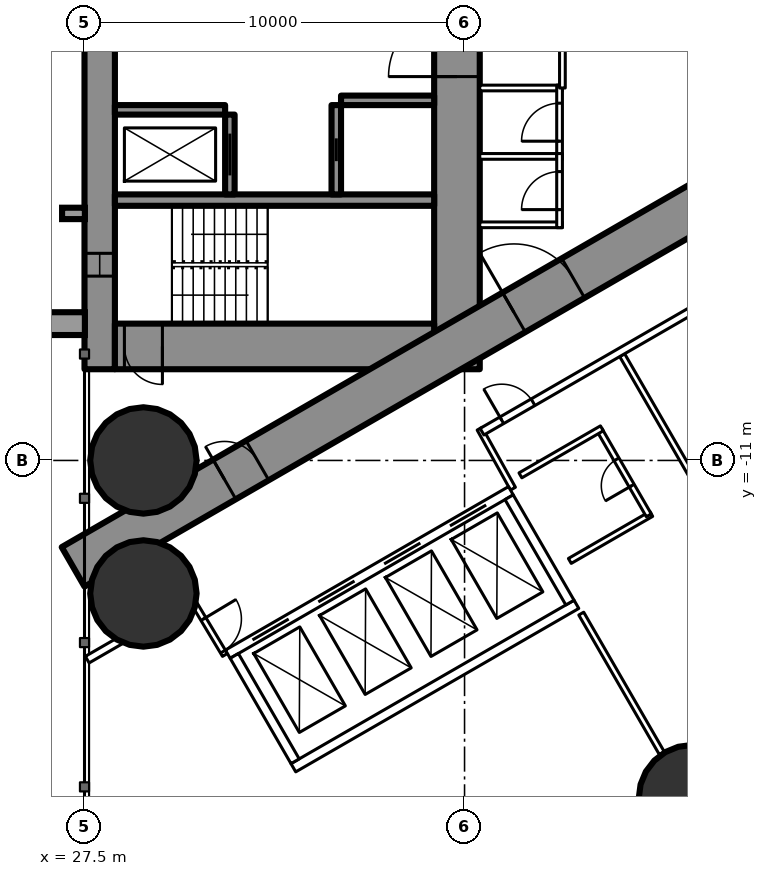
"""IFC4 building model, lengths in metres.
Left out: names, types, materials, properties, quantities, classifications, styles, units other than length and angle.
Written with IfcOpenShell. Run it as: python <this file> out.ifc"""

import sys

from ifc_helpers import new_model, si_unit, direction, frame, frame_2d, origin, origin_2d, place, context, subcontext, project, spatial, rectangle, hollow_circle, extrude, element, fill, save


model = new_model("IFC4")
c1 = context("Model", 3, precision=1e-05, world=origin(), true_north=direction((0.0, 1.0)))
c2 = subcontext(c1, "Body", "Model", "MODEL_VIEW")
j1 = project(units=[si_unit("LENGTHUNIT", "METRE"), si_unit("PLANEANGLEUNIT", "RADIAN")], contexts=[c1])
p1 = place(None, origin())
s1 = spatial("IfcSite", under=j1, at=p1, CompositionType="ELEMENT")
p2 = place(p1, origin())
s2 = spatial("IfcBuilding", under=s1, at=p2, CompositionType="ELEMENT")
p3 = place(p2, frame((0.0, 0.0, 70.5)))
s3 = spatial("IfcBuildingStorey", under=s2, at=p3, CompositionType="ELEMENT", Elevation=70.5)
for number, where, z_axis, x_axis in (
    (1, (29.05, -11.0, 0.0), (0.0, 0.0, 1.0), (1.0, 0.0, 0.0)),
    (2, (29.05, -14.5, 0.0), (0.0, 0.0, 1.0), (1.0, 0.0, 0.0)),
    (3, (43.484, -19.886, 0.0), (0.0, 0.0, 1.0), (1.0, 0.0, 0.0)),
):
    element("IfcColumn", number, at=place(p3, frame(where, z_axis=z_axis, x_axis=x_axis)), inside=s3, PredefinedType="COLUMN", context=c2, shape_type="SweptSolid", body=[
        extrude(hollow_circle(Radius=1.4, WallThickness=0.12, at=origin_2d()), origin(), (0.0, 0.0, 1.0), 3.5),
    ])
p4 = place(p3, frame((27.9, -8.6, 0.0), z_axis=(0.0, 0.0, 1.0), x_axis=(0.0, 1.0, 0.0)))
e4 = element("IfcWall", 4, at=p4, inside=s3, PredefinedType="SHEAR", context=c2, shape_type="SweptSolid", body=[
    extrude(rectangle(XDim=17.2, YDim=0.8, at=frame_2d((8.6, 0.0))), origin(), (0.0, 0.0, 1.0), 3.5),
])
p5 = place(p4, frame((2.45, 0.0, 0.6)))
e5 = element("IfcOpeningElement", 5, at=p5, cuts=e4, PredefinedType="OPENING", context=c2, shape_type="SweptSolid", body=[
    extrude(rectangle(XDim=0.6, YDim=2.1, at=frame_2d((0.3, 1.05))), frame((0.0, 0.41, 0.0), z_axis=(0.0, -1.0, 0.0), x_axis=(1.0, 0.0, 0.0)), (0.0, 0.0, 1.0), 0.82),
])
p6 = place(p4, frame((14.15, 0.0, 0.6)))
e6 = element("IfcOpeningElement", 6, at=p6, cuts=e4, PredefinedType="OPENING", context=c2, shape_type="SweptSolid", body=[
    extrude(rectangle(XDim=0.6, YDim=2.1, at=frame_2d((0.3, 1.05))), frame((0.0, 0.41, 0.0), z_axis=(0.0, -1.0, 0.0), x_axis=(1.0, 0.0, 0.0)), (0.0, 0.0, 1.0), 0.82),
])
p7 = place(p3, frame((37.3, -8.6, 0.0), z_axis=(0.0, 0.0, 1.0), x_axis=(0.0, 1.0, 0.0)))
e7 = element("IfcWall", 7, at=p7, inside=s3, PredefinedType="SHEAR", context=c2, shape_type="SweptSolid", body=[
    extrude(rectangle(XDim=17.2, YDim=1.2, at=frame_2d((8.6, 0.0))), origin(), (0.0, 0.0, 1.0), 3.5),
])
p8 = place(p7, frame((7.7, 0.0, 0.0)))
e8 = element("IfcOpeningElement", 8, at=p8, cuts=e7, PredefinedType="OPENING", context=c2, shape_type="SweptSolid", body=[
    extrude(rectangle(XDim=1.8, YDim=2.2, at=frame_2d((0.9, 1.1))), frame((0.0, 0.61, 0.0), z_axis=(0.0, -1.0, 0.0), x_axis=(1.0, 0.0, 0.0)), (0.0, 0.0, 1.0), 1.22),
])
p9 = place(p3, frame((28.3, -8.0, 0.0), z_axis=(0.0, 0.0, 1.0), x_axis=(1.0, 0.0, 0.0)))
e9 = element("IfcWall", 9, at=p9, inside=s3, PredefinedType="SHEAR", context=c2, shape_type="SweptSolid", body=[
    extrude(rectangle(XDim=8.4, YDim=1.2, at=frame_2d((4.2, 0.0))), origin(), (0.0, 0.0, 1.0), 3.5),
])
p10 = place(p9, frame((0.25, 0.0, 0.0)))
e10 = element("IfcOpeningElement", 10, at=p10, cuts=e9, PredefinedType="OPENING", context=c2, shape_type="SweptSolid", body=[
    extrude(rectangle(XDim=1.0, YDim=2.2, at=frame_2d((0.5, 1.1))), frame((0.0, 0.61, 0.0), z_axis=(0.0, -1.0, 0.0), x_axis=(1.0, 0.0, 0.0)), (0.0, 0.0, 1.0), 1.22),
])
p11 = place(p3, frame((28.3, -4.15, 0.0), z_axis=(0.0, 0.0, 1.0), x_axis=(1.0, 0.0, 0.0)))
e11 = element("IfcWall", 11, at=p11, inside=s3, PredefinedType="SHEAR", context=c2, shape_type="SweptSolid", body=[
    extrude(rectangle(XDim=8.4, YDim=0.3, at=frame_2d((4.2, 0.0))), origin(), (0.0, 0.0, 1.0), 3.5),
])
p12 = place(p3, frame((31.325, -4.0, 0.0), z_axis=(0.0, 0.0, 1.0), x_axis=(0.0, 1.0, 0.0)))
e12 = element("IfcWall", 12, at=p12, inside=s3, PredefinedType="SHEAR", context=c2, shape_type="SweptSolid", body=[
    extrude(rectangle(XDim=2.1, YDim=0.25, at=frame_2d((1.05, 0.0))), origin(), (0.0, 0.0, 1.0), 3.5),
])
p13 = place(p12, frame((0.5, 0.0, 0.0)))
e13 = element("IfcOpeningElement", 13, at=p13, cuts=e12, PredefinedType="OPENING", context=c2, shape_type="SweptSolid", body=[
    extrude(rectangle(XDim=1.1, YDim=2.2, at=frame_2d((0.55, 1.1))), frame((0.0, 0.135, 0.0), z_axis=(0.0, -1.0, 0.0), x_axis=(1.0, 0.0, 0.0)), (0.0, 0.0, 1.0), 0.27),
])
p14 = place(p3, frame((34.125, -4.0, 0.0), z_axis=(0.0, 0.0, 1.0), x_axis=(0.0, 1.0, 0.0)))
e14 = element("IfcWall", 14, at=p14, inside=s3, PredefinedType="SHEAR", context=c2, shape_type="SweptSolid", body=[
    extrude(rectangle(XDim=2.35, YDim=0.25, at=frame_2d((1.175, 0.0))), origin(), (0.0, 0.0, 1.0), 3.5),
])
p15 = place(p14, frame((0.875, 0.0, 0.0)))
e15 = element("IfcOpeningElement", 15, at=p15, cuts=e14, PredefinedType="OPENING", context=c2, shape_type="SweptSolid", body=[
    extrude(rectangle(XDim=0.6, YDim=2.0, at=frame_2d((0.3, 1.0))), frame((0.0, 0.135, 0.0), z_axis=(0.0, -1.0, 0.0), x_axis=(1.0, 0.0, 0.0)), (0.0, 0.0, 1.0), 0.27),
])
p16 = place(p3, frame((28.3, -1.775, 0.0), z_axis=(0.0, 0.0, 1.0), x_axis=(1.0, 0.0, 0.0)))
e16 = element("IfcWall", 16, at=p16, inside=s3, PredefinedType="SHEAR", context=c2, shape_type="SweptSolid", body=[
    extrude(rectangle(XDim=2.9, YDim=0.25, at=frame_2d((1.45, 0.0))), origin(), (0.0, 0.0, 1.0), 3.5),
])
p17 = place(p3, frame((34.25, -1.525, 0.0), z_axis=(0.0, 0.0, 1.0), x_axis=(1.0, 0.0, 0.0)))
e17 = element("IfcWall", 17, at=p17, inside=s3, PredefinedType="SHEAR", context=c2, shape_type="SweptSolid", body=[
    extrude(rectangle(XDim=2.45, YDim=0.25, at=frame_2d((1.225, 0.0))), origin(), (0.0, 0.0, 1.0), 3.5),
])
p18 = place(p3, frame((27.2, -13.8, 0.0), z_axis=(0.0, 0.0, 1.0), x_axis=(0.866027159892, 0.499996958321, 0.0)))
e18 = element("IfcWall", 18, at=p18, inside=s3, PredefinedType="SHEAR", context=c2, shape_type="SweptSolid", body=[
    extrude(rectangle(XDim=27.947, YDim=1.2, at=frame_2d((13.973, 0.0))), origin(), (0.0, 0.0, 1.0), 3.5),
])
p19 = place(p18, frame((4.6, 0.0, 0.0)))
e19 = element("IfcOpeningElement", 19, at=p19, cuts=e18, PredefinedType="OPENING", context=c2, shape_type="SweptSolid", body=[
    extrude(rectangle(XDim=1.0, YDim=2.2, at=frame_2d((0.5, 1.1))), frame((0.0, 0.61, 0.0), z_axis=(0.0, -1.0, 0.0), x_axis=(1.0, 0.0, 0.0)), (0.0, 0.0, 1.0), 1.22),
])
p20 = place(p18, frame((13.395, 0.0, 0.0)))
e20 = element("IfcOpeningElement", 20, at=p20, cuts=e18, PredefinedType="OPENING", context=c2, shape_type="SweptSolid", body=[
    extrude(rectangle(XDim=1.8, YDim=2.2, at=frame_2d((0.9, 1.1))), frame((0.0, 0.61, 0.0), z_axis=(0.0, -1.0, 0.0), x_axis=(1.0, 0.0, 0.0)), (0.0, 0.0, 1.0), 1.22),
])
p21 = place(p3, frame((41.647, -8.23, 0.0), z_axis=(0.0, 0.0, 1.0), x_axis=(0.49998590462, -0.866033541603, 0.0)))
e21 = element("IfcWall", 21, at=p21, inside=s3, PredefinedType="PARTITIONING", context=c2, shape_type="SweptSolid", body=[
    extrude(rectangle(XDim=12.621, YDim=0.15, at=frame_2d((6.311, 0.0))), origin(), (0.0, 0.0, 1.0), 3.25),
])
p22 = place(p3, frame((40.57, -15.03, 0.0), z_axis=(0.0, 0.0, 1.0), x_axis=(0.500012993597, -0.866017901798, 0.0)))
e22 = element("IfcWall", 22, at=p22, inside=s3, PredefinedType="PARTITIONING", context=c2, shape_type="SweptSolid", body=[
    extrude(rectangle(XDim=4.243, YDim=0.15, at=frame_2d((2.122, 0.0))), origin(), (0.0, 0.0, 1.0), 3.25),
])
p23 = place(p3, frame((27.572, -16.241, 0.0), z_axis=(0.0, 0.0, 1.0), x_axis=(0.866029654818, 0.499992636921, 0.0)))
e23 = element("IfcWall", 23, at=p23, inside=s3, PredefinedType="PARTITIONING", context=c2, shape_type="SweptSolid", body=[
    extrude(rectangle(XDim=3.155, YDim=0.2, at=frame_2d((1.577, 0.0))), origin(), (0.0, 0.0, 1.0), 3.25),
])
p24 = place(p3, frame((38.773, -11.742, 0.0), z_axis=(0.0, 0.0, 1.0), x_axis=(-0.485528096672, 0.8742210632, 0.0)))
e24 = element("IfcWall", 24, at=p24, inside=s3, PredefinedType="PARTITIONING", context=c2, shape_type="SweptSolid", body=[
    extrude(rectangle(XDim=1.805, YDim=0.15, at=frame_2d((0.903, 0.0))), origin(), (0.0, 0.0, 1.0), 3.25),
])
p25 = place(p3, frame((30.267, -14.569, 0.0), z_axis=(0.0, 0.0, 1.0), x_axis=(0.514336634837, -0.857588377991, 0.0)))
e25 = element("IfcWall", 25, at=p25, inside=s3, PredefinedType="PARTITIONING", context=c2, shape_type="SweptSolid", body=[
    extrude(rectangle(XDim=1.805, YDim=0.15, at=frame_2d((0.903, 0.0))), origin(), (0.0, 0.0, 1.0), 3.25),
])
p26 = place(p25, frame((0.703, 0.0, 0.0)))
e26 = element("IfcOpeningElement", 26, at=p26, cuts=e25, PredefinedType="OPENING", context=c2, shape_type="SweptSolid", body=[
    extrude(rectangle(XDim=1.0, YDim=2.2, at=frame_2d((0.5, 1.1))), frame((0.0, 0.085, 0.0), z_axis=(0.0, -1.0, 0.0), x_axis=(1.0, 0.0, 0.0)), (0.0, 0.0, 1.0), 0.17),
])
p27 = place(p3, frame((37.96, -10.243, 0.0), z_axis=(0.0, 0.0, 1.0), x_axis=(0.866030548046, 0.499991089772, 0.0)))
e27 = element("IfcWall", 27, at=p27, inside=s3, PredefinedType="PARTITIONING", context=c2, shape_type="SweptSolid", body=[
    extrude(rectangle(XDim=12.849, YDim=0.2, at=frame_2d((6.425, 0.0))), origin(), (0.0, 0.0, 1.0), 3.25),
])
p28 = place(p27, frame((8.949, 0.0, 0.0)))
e28 = element("IfcOpeningElement", 28, at=p28, cuts=e27, PredefinedType="OPENING", context=c2, shape_type="SweptSolid", body=[
    extrude(rectangle(XDim=0.95, YDim=2.2, at=frame_2d((0.475, 1.1))), frame((0.0, 0.11, 0.0), z_axis=(0.0, -1.0, 0.0), x_axis=(1.0, 0.0, 0.0)), (0.0, 0.0, 1.0), 0.22),
])
p29 = place(p27, frame((0.6, 0.0, 0.0)))
e29 = element("IfcOpeningElement", 29, at=p29, cuts=e27, PredefinedType="OPENING", context=c2, shape_type="SweptSolid", body=[
    extrude(rectangle(XDim=0.95, YDim=2.2, at=frame_2d((0.475, 1.1))), frame((0.0, 0.11, 0.0), z_axis=(0.0, -1.0, 0.0), x_axis=(1.0, 0.0, 0.0)), (0.0, 0.0, 1.0), 0.22),
])
p30 = place(p3, frame((40.27, -13.644, 0.0), z_axis=(0.0, 0.0, 1.0), x_axis=(0.866031185235, 0.4999899861, 0.0)))
e30 = element("IfcWall", 30, at=p30, inside=s3, PredefinedType="PARTITIONING", context=c2, shape_type="SweptSolid", body=[
    extrude(rectangle(XDim=2.475, YDim=0.15, at=frame_2d((1.238, 0.0))), origin(), (0.0, 0.0, 1.0), 3.25),
])
p31 = place(p3, frame((41.048, -10.193, 0.0), z_axis=(0.0, 0.0, 1.0), x_axis=(0.500047596559, -0.865997922154, 0.0)))
e31 = element("IfcWall", 31, at=p31, inside=s3, PredefinedType="PARTITIONING", context=c2, shape_type="SweptSolid", body=[
    extrude(rectangle(XDim=2.6, YDim=0.15, at=frame_2d((1.3, 0.0))), origin(), (0.0, 0.0, 1.0), 3.25),
])
p32 = place(p31, frame((0.9, 0.0, 0.0)))
e32 = element("IfcOpeningElement", 32, at=p32, cuts=e31, PredefinedType="OPENING", context=c2, shape_type="SweptSolid", body=[
    extrude(rectangle(XDim=0.8, YDim=2.2, at=frame_2d((0.4, 1.1))), frame((0.0, 0.085, 0.0), z_axis=(0.0, -1.0, 0.0), x_axis=(1.0, 0.0, 0.0)), (0.0, 0.0, 1.0), 0.17),
])
p33 = place(p3, frame((38.97, -11.393, 0.0), z_axis=(0.0, 0.0, 1.0), x_axis=(0.866031185235, 0.4999899861, 0.0)))
e33 = element("IfcWall", 33, at=p33, inside=s3, PredefinedType="PARTITIONING", context=c2, shape_type="SweptSolid", body=[
    extrude(rectangle(XDim=2.475, YDim=0.15, at=frame_2d((1.238, 0.0))), origin(), (0.0, 0.0, 1.0), 3.25),
])
for number, where, z_axis, x_axis in (
    (34, (37.9, -1.2, 0.0), (0.0, 0.0, 1.0), (1.0, 0.0, 0.0)),
    (35, (37.9, -3.0, 0.0), (0.0, 0.0, 1.0), (1.0, 0.0, 0.0)),
    (36, (37.9, -4.8, 0.0), (0.0, 0.0, 1.0), (1.0, 0.0, 0.0)),
):
    element("IfcWall", number, at=place(p3, frame(where, z_axis=z_axis, x_axis=x_axis)), inside=s3, PredefinedType="PARTITIONING", context=c2, shape_type="SweptSolid", body=[
        extrude(rectangle(XDim=2.175, YDim=0.15, at=frame_2d((1.087, 0.0))), origin(), (0.0, 0.0, 1.0), 3.25),
    ])
p34 = place(p3, frame((40.0, -3.075, 0.0), z_axis=(0.0, 0.0, 1.0), x_axis=(0.0, 1.0, 0.0)))
e37 = element("IfcWall", 37, at=p34, inside=s3, PredefinedType="PARTITIONING", context=c2, shape_type="SweptSolid", body=[
    extrude(rectangle(XDim=1.95, YDim=0.15, at=frame_2d((0.975, 0.0))), origin(), (0.0, 0.0, 1.0), 3.25),
])
p35 = place(p34, frame((0.475, 0.0, 0.0)))
e38 = element("IfcOpeningElement", 38, at=p35, cuts=e37, PredefinedType="OPENING", context=c2, shape_type="SweptSolid", body=[
    extrude(rectangle(XDim=1.0, YDim=2.2, at=frame_2d((0.5, 1.1))), frame((0.0, 0.085, 0.0), z_axis=(0.0, -1.0, 0.0), x_axis=(1.0, 0.0, 0.0)), (0.0, 0.0, 1.0), 0.17),
])
p36 = place(p3, frame((40.0, -4.875, 0.0), z_axis=(0.0, 0.0, 1.0), x_axis=(0.0, 1.0, 0.0)))
e39 = element("IfcWall", 39, at=p36, inside=s3, PredefinedType="PARTITIONING", context=c2, shape_type="SweptSolid", body=[
    extrude(rectangle(XDim=1.95, YDim=0.15, at=frame_2d((0.975, 0.0))), origin(), (0.0, 0.0, 1.0), 3.25),
])
p37 = place(p36, frame((0.475, 0.0, 0.0)))
e40 = element("IfcOpeningElement", 40, at=p37, cuts=e39, PredefinedType="OPENING", context=c2, shape_type="SweptSolid", body=[
    extrude(rectangle(XDim=1.0, YDim=2.2, at=frame_2d((0.5, 1.1))), frame((0.0, 0.085, 0.0), z_axis=(0.0, -1.0, 0.0), x_axis=(1.0, 0.0, 0.0)), (0.0, 0.0, 1.0), 0.17),
])
p38 = place(p3, frame((40.075, -1.2, 0.0), z_axis=(0.0, 0.0, 1.0), x_axis=(0.0, 1.0, 0.0)))
e41 = element("IfcWall", 41, at=p38, inside=s3, PredefinedType="PARTITIONING", context=c2, shape_type="SweptSolid", body=[
    extrude(rectangle(XDim=6.874, YDim=0.15, at=frame_2d((3.437, 0.0))), origin(), (0.0, 0.0, 1.0), 3.25),
])
p39 = place(p38, frame((2.537, 0.0, 0.0)))
e42 = element("IfcOpeningElement", 42, at=p39, cuts=e41, PredefinedType="OPENING", context=c2, shape_type="SweptSolid", body=[
    extrude(rectangle(XDim=1.8, YDim=2.2, at=frame_2d((0.9, 1.1))), frame((0.0, 0.085, 0.0), z_axis=(0.0, -1.0, 0.0), x_axis=(1.0, 0.0, 0.0)), (0.0, 0.0, 1.0), 0.17),
])
p40 = place(p3, frame((31.271, -16.097, 0.0), z_axis=(0.0, 0.0, 1.0), x_axis=(0.86604045752, 0.499973925258, 0.0)))
e43 = element("IfcWall", 43, at=p40, inside=s3, PredefinedType="PARTITIONING", context=c2, shape_type="SweptSolid", body=[
    extrude(rectangle(XDim=8.6, YDim=0.25, at=frame_2d((4.3, 0.0))), origin(), (0.0, 0.0, 1.0), 3.25),
])
p41 = place(p40, frame((0.75, 0.0, 0.0)))
e44 = element("IfcOpeningElement", 44, at=p41, cuts=e43, PredefinedType="OPENING", context=c2, shape_type="SweptSolid", body=[
    extrude(rectangle(XDim=1.1, YDim=2.2, at=frame_2d((0.55, 1.1))), frame((0.0, 0.135, 0.0), z_axis=(0.0, -1.0, 0.0), x_axis=(1.0, 0.0, 0.0)), (0.0, 0.0, 1.0), 0.27),
])
p42 = place(p40, frame((2.75, 0.0, 0.0)))
e45 = element("IfcOpeningElement", 45, at=p42, cuts=e43, PredefinedType="OPENING", context=c2, shape_type="SweptSolid", body=[
    extrude(rectangle(XDim=1.1, YDim=2.2, at=frame_2d((0.55, 1.1))), frame((0.0, 0.135, 0.0), z_axis=(0.0, -1.0, 0.0), x_axis=(1.0, 0.0, 0.0)), (0.0, 0.0, 1.0), 0.27),
])
p43 = place(p40, frame((4.75, 0.0, 0.0)))
e46 = element("IfcOpeningElement", 46, at=p43, cuts=e43, PredefinedType="OPENING", context=c2, shape_type="SweptSolid", body=[
    extrude(rectangle(XDim=1.1, YDim=2.2, at=frame_2d((0.55, 1.1))), frame((0.0, 0.135, 0.0), z_axis=(0.0, -1.0, 0.0), x_axis=(1.0, 0.0, 0.0)), (0.0, 0.0, 1.0), 0.27),
])
p44 = place(p40, frame((6.75, 0.0, 0.0)))
e47 = element("IfcOpeningElement", 47, at=p44, cuts=e43, PredefinedType="OPENING", context=c2, shape_type="SweptSolid", body=[
    extrude(rectangle(XDim=1.1, YDim=2.2, at=frame_2d((0.55, 1.1))), frame((0.0, 0.135, 0.0), z_axis=(0.0, -1.0, 0.0), x_axis=(1.0, 0.0, 0.0)), (0.0, 0.0, 1.0), 0.27),
])
p45 = place(p3, frame((32.996, -19.086, 0.0), z_axis=(0.0, 0.0, 1.0), x_axis=(0.866028165386, 0.499995216735, 0.0)))
e48 = element("IfcWall", 48, at=p45, inside=s3, PredefinedType="PARTITIONING", context=c2, shape_type="SweptSolid", body=[
    extrude(rectangle(XDim=8.6, YDim=0.25, at=frame_2d((4.3, 0.0))), origin(), (0.0, 0.0, 1.0), 3.25),
])
for number, where, z_axis, x_axis in (
    (49, (31.441, -16.143, 0.0), (0.0, 0.0, 1.0), (0.5, -0.866, 0.0)),
    (50, (38.673, -11.968, 0.0), (0.0, 0.0, 1.0), (0.5, -0.866, 0.0)),
):
    element("IfcWall", number, at=place(p3, frame(where, z_axis=z_axis, x_axis=x_axis)), inside=s3, PredefinedType="PARTITIONING", context=c2, shape_type="SweptSolid", body=[
        extrude(rectangle(XDim=3.201, YDim=0.25, at=frame_2d((1.6, 0.0))), origin(), (0.0, 0.0, 1.0), 3.25),
    ])
p46 = place(p32, origin())
e51 = element("IfcDoor", 51, at=p46, inside=s3, OperationType="SINGLE_SWING_RIGHT", PredefinedType="DOOR", context=c2, shape_type="SweptSolid", body=[
    extrude(rectangle(XDim=0.8, YDim=2.2, at=frame_2d((0.4, 1.1))), frame((0.0, 0.025, 0.0), z_axis=(0.0, -1.0, 0.0), x_axis=(1.0, 0.0, 0.0)), (0.0, 0.0, 1.0), 0.05),
])
fill(e32, e51)
p47 = place(p29, origin())
e52 = element("IfcDoor", 52, at=p47, inside=s3, OperationType="SINGLE_SWING_LEFT", PredefinedType="DOOR", context=c2, shape_type="SweptSolid", body=[
    extrude(rectangle(XDim=0.95, YDim=2.2, at=frame_2d((0.475, 1.1))), frame((0.0, 0.025, 0.0), z_axis=(0.0, -1.0, 0.0), x_axis=(1.0, 0.0, 0.0)), (0.0, 0.0, 1.0), 0.05),
])
fill(e29, e52)
p48 = place(p26, origin())
e53 = element("IfcDoor", 53, at=p48, inside=s3, OperationType="SINGLE_SWING_LEFT", PredefinedType="DOOR", context=c2, shape_type="SweptSolid", body=[
    extrude(rectangle(XDim=1.0, YDim=2.2, at=frame_2d((0.5, 1.1))), frame((0.0, 0.025, 0.0), z_axis=(0.0, -1.0, 0.0), x_axis=(1.0, 0.0, 0.0)), (0.0, 0.0, 1.0), 0.05),
])
fill(e26, e53)
p49 = place(p35, origin())
e54 = element("IfcDoor", 54, at=p49, inside=s3, OperationType="SINGLE_SWING_LEFT", PredefinedType="DOOR", context=c2, shape_type="SweptSolid", body=[
    extrude(rectangle(XDim=1.0, YDim=2.2, at=frame_2d((0.5, 1.1))), frame((0.0, 0.025, 0.0), z_axis=(0.0, -1.0, 0.0), x_axis=(1.0, 0.0, 0.0)), (0.0, 0.0, 1.0), 0.05),
])
fill(e38, e54)
p50 = place(p37, origin())
e55 = element("IfcDoor", 55, at=p50, inside=s3, OperationType="SINGLE_SWING_LEFT", PredefinedType="DOOR", context=c2, shape_type="SweptSolid", body=[
    extrude(rectangle(XDim=1.0, YDim=2.2, at=frame_2d((0.5, 1.1))), frame((0.0, 0.025, 0.0), z_axis=(0.0, -1.0, 0.0), x_axis=(1.0, 0.0, 0.0)), (0.0, 0.0, 1.0), 0.05),
])
fill(e40, e55)
p51 = place(p19, origin())
e56 = element("IfcDoor", 56, at=p51, inside=s3, OperationType="SINGLE_SWING_LEFT", PredefinedType="DOOR", context=c2, shape_type="SweptSolid", body=[
    extrude(rectangle(XDim=1.0, YDim=2.2, at=frame_2d((0.5, 1.1))), frame((0.0, 0.025, 0.0), z_axis=(0.0, -1.0, 0.0), x_axis=(1.0, 0.0, 0.0)), (0.0, 0.0, 1.0), 0.05),
])
fill(e19, e56)
p52 = place(p20, origin())
e57 = element("IfcDoor", 57, at=p52, inside=s3, OperationType="DOUBLE_DOOR_SINGLE_SWING", PredefinedType="DOOR", context=c2, shape_type="SweptSolid", body=[
    extrude(rectangle(XDim=1.8, YDim=2.2, at=frame_2d((0.9, 1.1))), frame((0.0, 0.025, 0.0), z_axis=(0.0, -1.0, 0.0), x_axis=(1.0, 0.0, 0.0)), (0.0, 0.0, 1.0), 0.05),
])
fill(e20, e57)
p53 = place(p8, origin())
e58 = element("IfcDoor", 58, at=p53, inside=s3, OperationType="DOUBLE_DOOR_SINGLE_SWING", PredefinedType="DOOR", context=c2, shape_type="SweptSolid", body=[
    extrude(rectangle(XDim=1.8, YDim=2.2, at=frame_2d((0.9, 1.1))), frame((0.0, 0.025, 0.0), z_axis=(0.0, -1.0, 0.0), x_axis=(1.0, 0.0, 0.0)), (0.0, 0.0, 1.0), 0.05),
])
fill(e8, e58)
p54 = place(p10, origin())
e59 = element("IfcDoor", 59, at=p54, inside=s3, OperationType="SINGLE_SWING_RIGHT", PredefinedType="DOOR", context=c2, shape_type="SweptSolid", body=[
    extrude(rectangle(XDim=1.0, YDim=2.2, at=frame_2d((0.5, 1.1))), frame((0.0, 0.025, 0.0), z_axis=(0.0, -1.0, 0.0), x_axis=(1.0, 0.0, 0.0)), (0.0, 0.0, 1.0), 0.05),
])
fill(e10, e59)
p55 = place(p13, origin())
e60 = element("IfcDoor", 60, at=p55, inside=s3, OperationType="SLIDING_TO_LEFT", PredefinedType="USERDEFINED", context=c2, shape_type="SweptSolid", body=[
    extrude(rectangle(XDim=1.1, YDim=2.2, at=frame_2d((0.55, 1.1))), frame((0.0, 0.025, 0.0), z_axis=(0.0, -1.0, 0.0), x_axis=(1.0, 0.0, 0.0)), (0.0, 0.0, 1.0), 0.05),
])
fill(e13, e60)
p56 = place(p15, origin())
e61 = element("IfcDoor", 61, at=p56, inside=s3, OperationType="SLIDING_TO_LEFT", PredefinedType="DOOR", context=c2, shape_type="SweptSolid", body=[
    extrude(rectangle(XDim=0.6, YDim=2.0, at=frame_2d((0.3, 1.0))), frame((0.0, 0.025, 0.0), z_axis=(0.0, -1.0, 0.0), x_axis=(1.0, 0.0, 0.0)), (0.0, 0.0, 1.0), 0.05),
])
fill(e15, e61)
p57 = place(p41, origin())
e62 = element("IfcDoor", 62, at=p57, inside=s3, OperationType="DOUBLE_DOOR_SLIDING", PredefinedType="USERDEFINED", context=c2, shape_type="SweptSolid", body=[
    extrude(rectangle(XDim=1.1, YDim=2.2, at=frame_2d((0.55, 1.1))), frame((0.0, 0.025, 0.0), z_axis=(0.0, -1.0, 0.0), x_axis=(1.0, 0.0, 0.0)), (0.0, 0.0, 1.0), 0.05),
])
fill(e44, e62)
p58 = place(p42, origin())
e63 = element("IfcDoor", 63, at=p58, inside=s3, OperationType="DOUBLE_DOOR_SLIDING", PredefinedType="USERDEFINED", context=c2, shape_type="SweptSolid", body=[
    extrude(rectangle(XDim=1.1, YDim=2.2, at=frame_2d((0.55, 1.1))), frame((0.0, 0.025, 0.0), z_axis=(0.0, -1.0, 0.0), x_axis=(1.0, 0.0, 0.0)), (0.0, 0.0, 1.0), 0.05),
])
fill(e45, e63)
p59 = place(p43, origin())
e64 = element("IfcDoor", 64, at=p59, inside=s3, OperationType="DOUBLE_DOOR_SLIDING", PredefinedType="USERDEFINED", context=c2, shape_type="SweptSolid", body=[
    extrude(rectangle(XDim=1.1, YDim=2.2, at=frame_2d((0.55, 1.1))), frame((0.0, 0.025, 0.0), z_axis=(0.0, -1.0, 0.0), x_axis=(1.0, 0.0, 0.0)), (0.0, 0.0, 1.0), 0.05),
])
fill(e46, e64)
p60 = place(p44, origin())
e65 = element("IfcDoor", 65, at=p60, inside=s3, OperationType="DOUBLE_DOOR_SLIDING", PredefinedType="USERDEFINED", context=c2, shape_type="SweptSolid", body=[
    extrude(rectangle(XDim=1.1, YDim=2.2, at=frame_2d((0.55, 1.1))), frame((0.0, 0.025, 0.0), z_axis=(0.0, -1.0, 0.0), x_axis=(1.0, 0.0, 0.0)), (0.0, 0.0, 1.0), 0.05),
])
fill(e47, e65)
p61 = place(p5, origin())
e66 = element("IfcWindow", 66, at=p61, inside=s3, PartitioningType="SINGLE_PANEL", PredefinedType="WINDOW", context=c2, shape_type="SweptSolid", body=[
    extrude(rectangle(XDim=0.6, YDim=2.1, at=frame_2d((0.3, 1.05))), frame((0.0, 0.03, 0.0), z_axis=(0.0, -1.0, 0.0), x_axis=(1.0, 0.0, 0.0)), (0.0, 0.0, 1.0), 0.06),
])
fill(e5, e66)
save(model, sys.argv[1])
